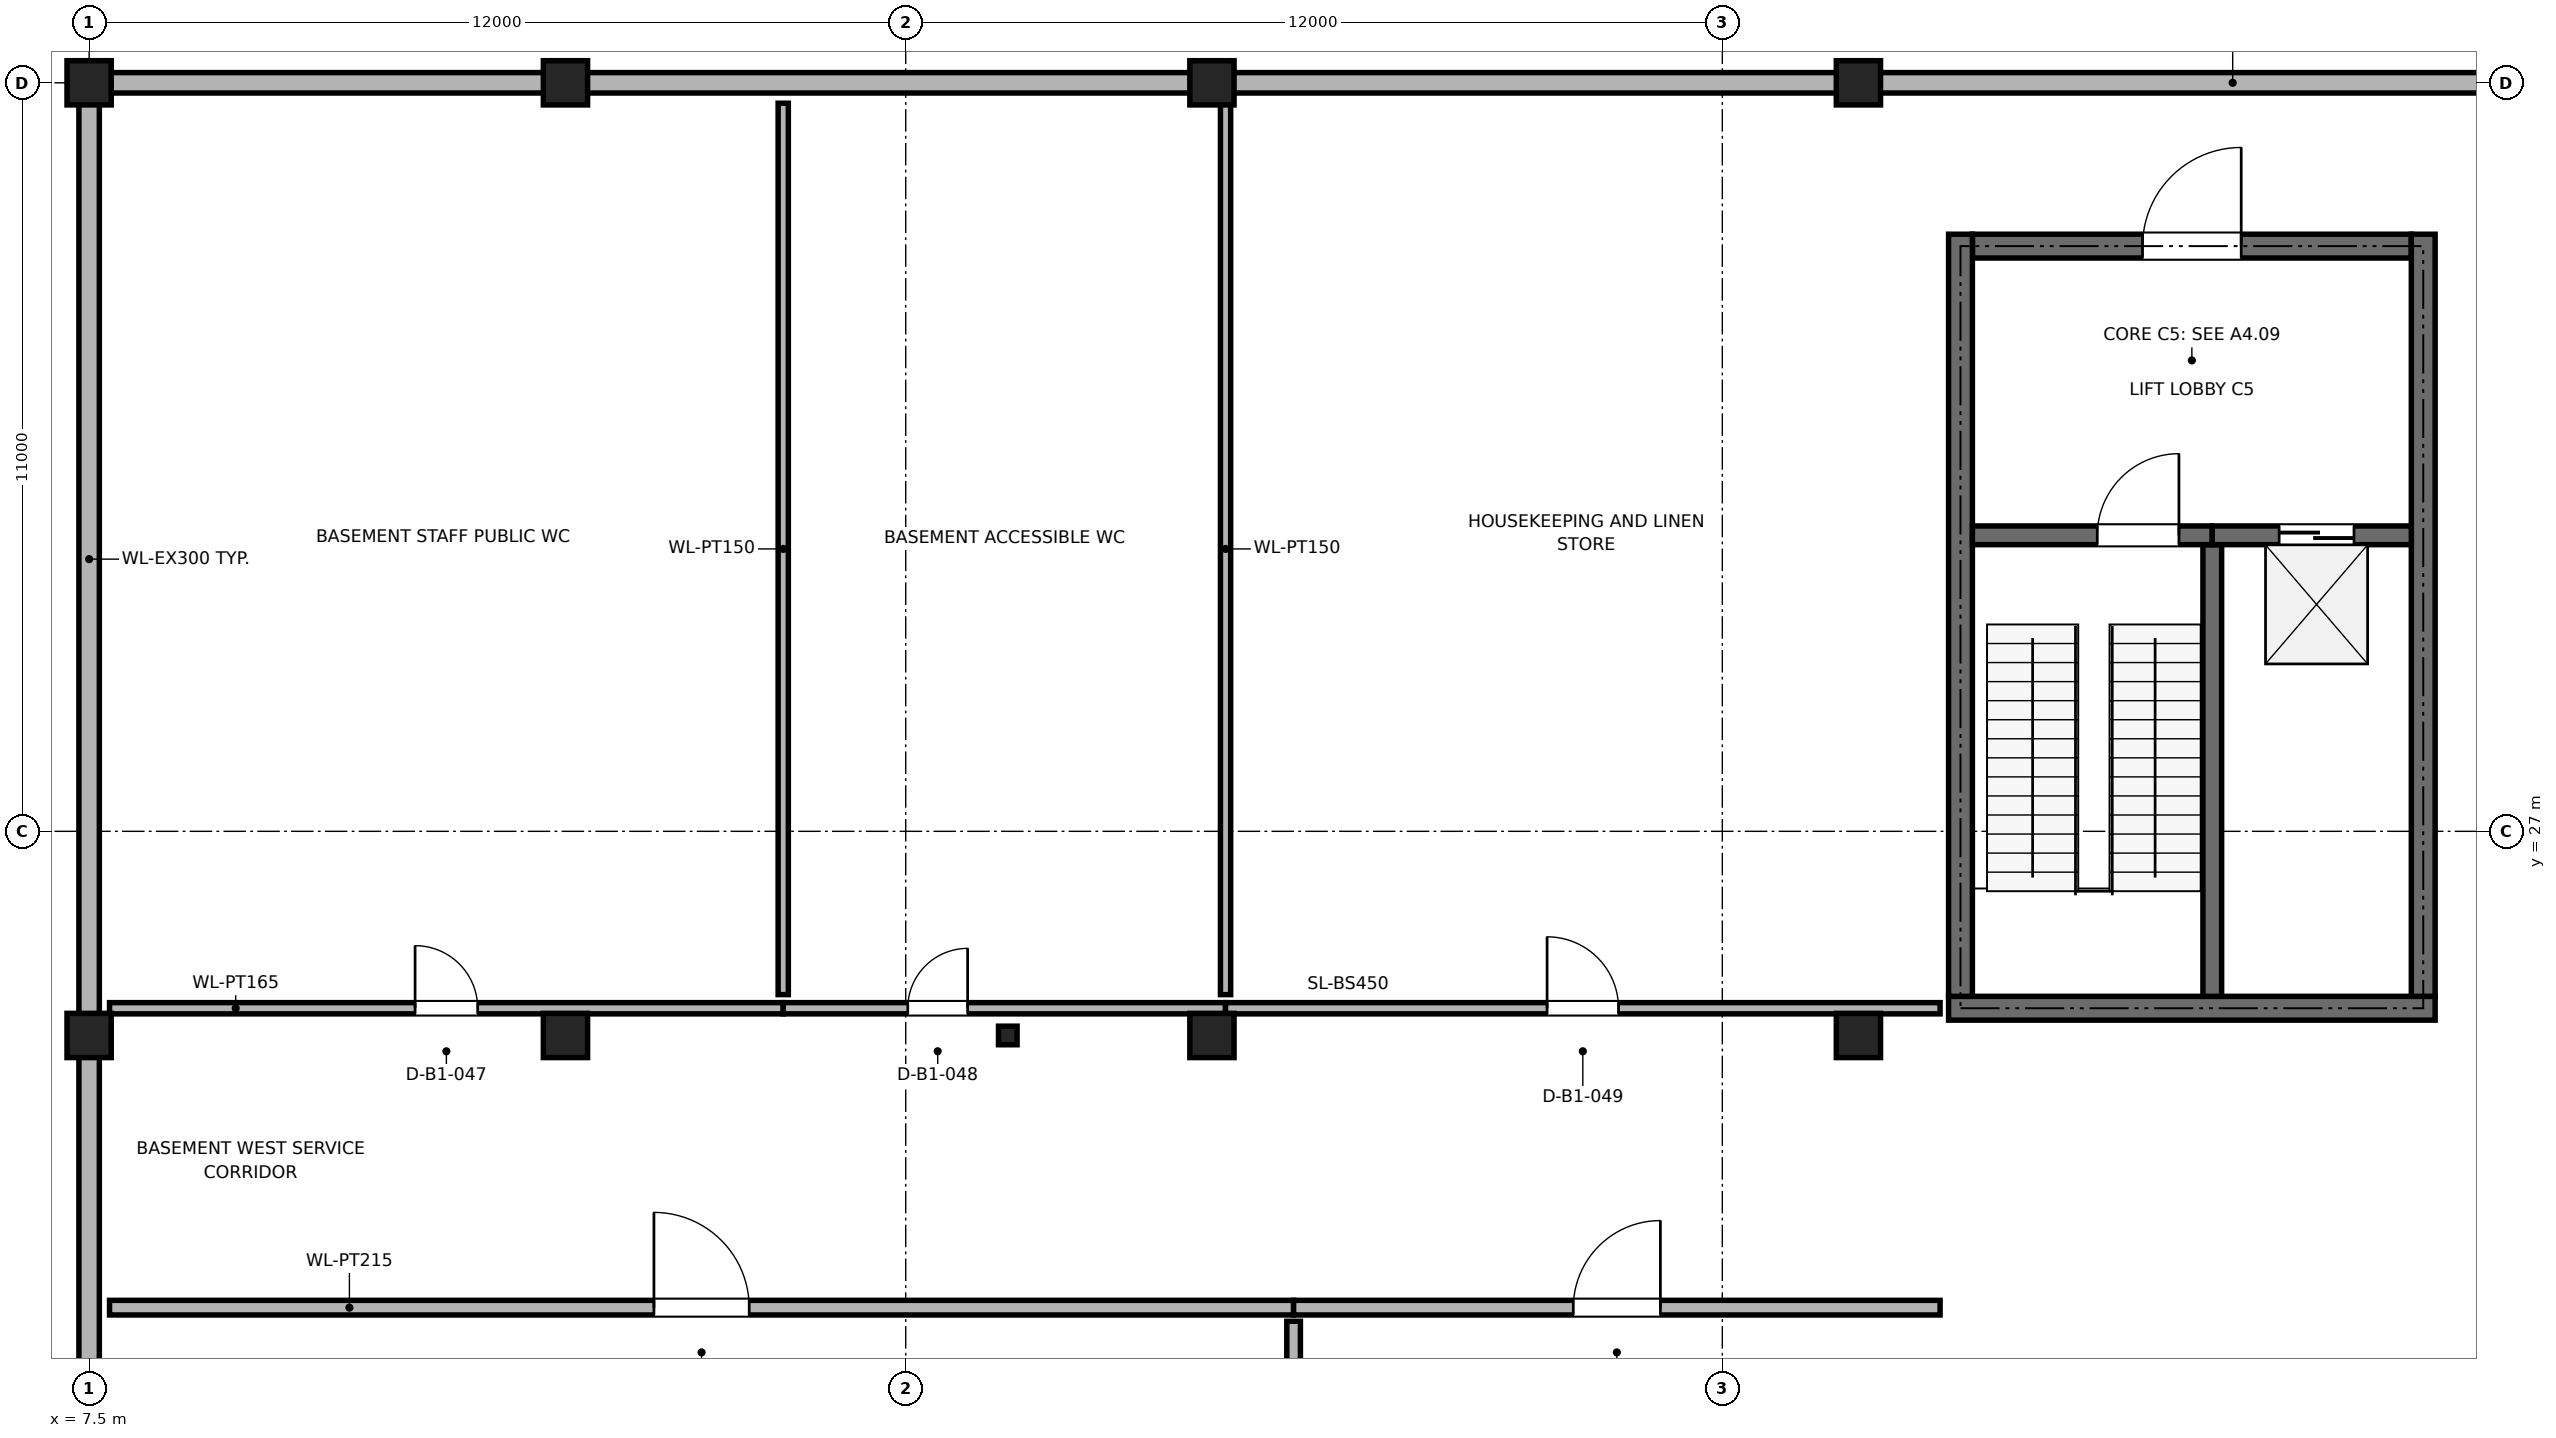
"""IFC4 building model, lengths in metres.
Left out: names, types, materials, properties, quantities, classifications, styles, units other than length and angle.
Written with IfcOpenShell. Run it as: python <this file> out.ifc"""

import sys

from ifc_helpers import new_model, si_unit, direction, frame, frame_2d, origin, origin_2d, place, context, subcontext, project, spatial, rectangle, hollow_circle, extrude, element, fill, save


model = new_model("IFC4")
c1 = context("Model", 3, precision=1e-05, world=origin(), true_north=direction((0.0, 1.0)))
c2 = subcontext(c1, "Body", "Model", "MODEL_VIEW")
j1 = project(units=[si_unit("LENGTHUNIT", "METRE"), si_unit("PLANEANGLEUNIT", "RADIAN")], contexts=[c1])
p1 = place(None, origin())
s1 = spatial("IfcSite", under=j1, at=p1, CompositionType="ELEMENT")
p2 = place(p1, origin())
s2 = spatial("IfcBuilding", under=s1, at=p2, CompositionType="ELEMENT")
p3 = place(p2, frame((0.0, 0.0, -4.8)))
s3 = spatial("IfcBuildingStorey", under=s2, at=p3, CompositionType="ELEMENT", Elevation=-4.8)
for number, where, z_axis, x_axis in (
    (1, (33.5, 38.0, 0.0), (0.0, 0.0, 1.0), (1.0, 0.0, 0.0)),
    (2, (24.0, 38.0, 0.0), (0.0, 0.0, 1.0), (1.0, 0.0, 0.0)),
    (3, (14.5, 38.0, 0.0), (0.0, 0.0, 1.0), (1.0, 0.0, 0.0)),
    (4, (7.5, 38.0, 0.0), (0.0, 0.0, 1.0), (1.0, 0.0, 0.0)),
    (5, (7.5, 24.0, 0.0), (0.0, 0.0, 1.0), (1.0, 0.0, 0.0)),
    (6, (14.5, 24.0, 0.0), (0.0, 0.0, 1.0), (1.0, 0.0, 0.0)),
    (7, (24.0, 24.0, 0.0), (0.0, 0.0, 1.0), (1.0, 0.0, 0.0)),
    (8, (33.5, 24.0, 0.0), (0.0, 0.0, 1.0), (1.0, 0.0, 0.0)),
):
    element("IfcColumn", number, at=place(p3, frame(where, z_axis=z_axis, x_axis=x_axis)), inside=s3, PredefinedType="COLUMN", context=c2, shape_type="SweptSolid", body=[
        extrude(rectangle(XDim=0.65, YDim=0.65, at=origin_2d()), origin(), (0.0, 0.0, 1.0), 4.8),
    ])
p4 = place(p3, frame((21.0, 24.0, 0.0), z_axis=(0.0, 0.0, 1.0), x_axis=(1.0, 0.0, 0.0)))
e9 = element("IfcColumn", 9, at=p4, inside=s3, PredefinedType="COLUMN", context=c2, shape_type="SweptSolid", body=[
    extrude(hollow_circle(Radius=0.136, WallThickness=0.016, at=origin_2d()), origin(), (0.0, 0.0, 1.0), 4.8),
])
p5 = place(p3, frame((33.52, 38.0, 0.0), z_axis=(0.0, 0.0, 1.0), x_axis=(1.0, 0.0, 0.0)))
e10 = element("IfcWall", 10, at=p5, inside=s3, PredefinedType="SOLIDWALL", context=c2, shape_type="SweptSolid", body=[
    extrude(rectangle(XDim=10.96, YDim=0.3, at=frame_2d((5.48, 0.0))), origin(), (0.0, 0.0, 1.0), 3.738),
])
for number, where, z_axis, x_axis in (
    (11, (24.02, 38.0, 0.0), (0.0, 0.0, 1.0), (1.0, 0.0, 0.0)),
    (12, (14.52, 38.0, 0.0), (0.0, 0.0, 1.0), (1.0, 0.0, 0.0)),
):
    element("IfcWall", number, at=place(p3, frame(where, z_axis=z_axis, x_axis=x_axis)), inside=s3, PredefinedType="SOLIDWALL", context=c2, shape_type="SweptSolid", body=[
        extrude(rectangle(XDim=9.46, YDim=0.3, at=frame_2d((4.73, 0.0))), origin(), (0.0, 0.0, 1.0), 3.738),
    ])
p6 = place(p3, frame((7.52, 38.0, 0.0), z_axis=(0.0, 0.0, 1.0), x_axis=(1.0, 0.0, 0.0)))
e13 = element("IfcWall", 13, at=p6, inside=s3, PredefinedType="SOLIDWALL", context=c2, shape_type="SweptSolid", body=[
    extrude(rectangle(XDim=6.96, YDim=0.3, at=frame_2d((3.48, 0.0))), origin(), (0.0, 0.0, 1.0), 3.738),
])
p7 = place(p3, frame((7.5, 24.02, 0.0), z_axis=(0.0, 0.0, 1.0), x_axis=(0.0, 1.0, 0.0)))
e14 = element("IfcWall", 14, at=p7, inside=s3, PredefinedType="SOLIDWALL", context=c2, shape_type="SweptSolid", body=[
    extrude(rectangle(XDim=13.96, YDim=0.3, at=frame_2d((6.98, 0.0))), origin(), (0.0, 0.0, 1.0), 3.738),
])
p8 = place(p3, frame((7.5, 11.52, 0.0), z_axis=(0.0, 0.0, 1.0), x_axis=(0.0, 1.0, 0.0)))
e15 = element("IfcWall", 15, at=p8, inside=s3, PredefinedType="SOLIDWALL", context=c2, shape_type="SweptSolid", body=[
    extrude(rectangle(XDim=12.46, YDim=0.3, at=frame_2d((6.23, 0.0))), origin(), (0.0, 0.0, 1.0), 3.738),
])
p9 = place(p3, frame((34.825, 24.4, 0.0), z_axis=(0.0, 0.0, 1.0), x_axis=(1.0, 0.0, 0.0)))
e16 = element("IfcWall", 16, at=p9, inside=s3, PredefinedType="SHEAR", context=c2, shape_type="SweptSolid", body=[
    extrude(rectangle(XDim=7.15, YDim=0.35, at=frame_2d((3.575, 0.0))), origin(), (0.0, 0.0, 1.0), 4.5),
])
p10 = place(p3, frame((35.175, 35.6, 0.0), z_axis=(0.0, 0.0, 1.0), x_axis=(1.0, 0.0, 0.0)))
e17 = element("IfcWall", 17, at=p10, inside=s3, PredefinedType="SHEAR", context=c2, shape_type="SweptSolid", body=[
    extrude(rectangle(XDim=6.45, YDim=0.35, at=frame_2d((3.225, 0.0))), origin(), (0.0, 0.0, 1.0), 4.5),
])
p11 = place(p10, frame((2.5, 0.0, 0.0)))
e18 = element("IfcOpeningElement", 18, at=p11, cuts=e17, PredefinedType="OPENING", context=c2, shape_type="SweptSolid", body=[
    extrude(rectangle(XDim=1.45, YDim=2.2, at=frame_2d((0.725, 1.1))), frame((0.0, 0.185, 0.0), z_axis=(0.0, -1.0, 0.0), x_axis=(1.0, 0.0, 0.0)), (0.0, 0.0, 1.0), 0.37),
])
for number, where, z_axis, x_axis in (
    (19, (35.0, 24.575, 0.0), (0.0, 0.0, 1.0), (0.0, 1.0, 0.0)),
    (20, (41.8, 24.575, 0.0), (0.0, 0.0, 1.0), (0.0, 1.0, 0.0)),
):
    element("IfcWall", number, at=place(p3, frame(where, z_axis=z_axis, x_axis=x_axis)), inside=s3, PredefinedType="SHEAR", context=c2, shape_type="SweptSolid", body=[
        extrude(rectangle(XDim=11.2, YDim=0.35, at=frame_2d((5.6, 0.0))), origin(), (0.0, 0.0, 1.0), 4.5),
    ])
p12 = place(p3, frame((38.7, 24.575, 0.0), z_axis=(0.0, 0.0, 1.0), x_axis=(0.0, 1.0, 0.0)))
e21 = element("IfcWall", 21, at=p12, inside=s3, PredefinedType="SHEAR", context=c2, shape_type="SweptSolid", body=[
    extrude(rectangle(XDim=6.637, YDim=0.275, at=frame_2d((3.319, 0.0))), origin(), (0.0, 0.0, 1.0), 4.5),
])
p13 = place(p3, frame((35.175, 31.35, 0.0), z_axis=(0.0, 0.0, 1.0), x_axis=(1.0, 0.0, 0.0)))
e22 = element("IfcWall", 22, at=p13, inside=s3, PredefinedType="SHEAR", context=c2, shape_type="SweptSolid", body=[
    extrude(rectangle(XDim=3.525, YDim=0.275, at=frame_2d((1.762, 0.0))), origin(), (0.0, 0.0, 1.0), 4.5),
])
p14 = place(p13, frame((1.835, 0.0, 0.0)))
e23 = element("IfcOpeningElement", 23, at=p14, cuts=e22, PredefinedType="OPENING", context=c2, shape_type="SweptSolid", body=[
    extrude(rectangle(XDim=1.2, YDim=2.15, at=frame_2d((0.6, 1.075))), frame((0.0, 0.147, 0.0), z_axis=(0.0, -1.0, 0.0), x_axis=(1.0, 0.0, 0.0)), (0.0, 0.0, 1.0), 0.295),
])
p15 = place(p3, frame((38.7, 31.35, 0.0), z_axis=(0.0, 0.0, 1.0), x_axis=(1.0, 0.0, 0.0)))
e24 = element("IfcWall", 24, at=p15, inside=s3, PredefinedType="SHEAR", context=c2, shape_type="SweptSolid", body=[
    extrude(rectangle(XDim=2.925, YDim=0.275, at=frame_2d((1.462, 0.0))), origin(), (0.0, 0.0, 1.0), 4.5),
])
p16 = place(p15, frame((0.982, 0.0, 0.0)))
e25 = element("IfcOpeningElement", 25, at=p16, cuts=e24, PredefinedType="OPENING", context=c2, shape_type="SweptSolid", body=[
    extrude(rectangle(XDim=1.1, YDim=2.15, at=frame_2d((0.55, 1.075))), frame((0.0, 0.147, 0.0), z_axis=(0.0, -1.0, 0.0), x_axis=(1.0, 0.0, 0.0)), (0.0, 0.0, 1.0), 0.295),
])
p17 = place(p3, frame((7.8, 20.0, 0.0), z_axis=(0.0, 0.0, 1.0), x_axis=(1.0, 0.0, 0.0)))
e26 = element("IfcWall", 26, at=p17, inside=s3, PredefinedType="PARTITIONING", context=c2, shape_type="SweptSolid", body=[
    extrude(rectangle(XDim=17.4, YDim=0.215, at=frame_2d((8.7, 0.0))), origin(), (0.0, 0.0, 1.0), 3.74),
])
p18 = place(p17, frame((8.0, 0.0, 0.0)))
e27 = element("IfcOpeningElement", 27, at=p18, cuts=e26, PredefinedType="OPENING", context=c2, shape_type="SweptSolid", body=[
    extrude(rectangle(XDim=1.4, YDim=2.2, at=frame_2d((0.7, 1.1))), frame((0.0, 0.117, 0.0), z_axis=(0.0, -1.0, 0.0), x_axis=(1.0, 0.0, 0.0)), (0.0, 0.0, 1.0), 0.235),
])
p19 = place(p3, frame((25.2, 20.0, 0.0), z_axis=(0.0, 0.0, 1.0), x_axis=(1.0, 0.0, 0.0)))
e28 = element("IfcWall", 28, at=p19, inside=s3, PredefinedType="PARTITIONING", context=c2, shape_type="SweptSolid", body=[
    extrude(rectangle(XDim=9.5, YDim=0.215, at=frame_2d((4.75, 0.0))), origin(), (0.0, 0.0, 1.0), 3.74),
])
p20 = place(p19, frame((4.11, 0.0, 0.0)))
e29 = element("IfcOpeningElement", 29, at=p20, cuts=e28, PredefinedType="OPENING", context=c2, shape_type="SweptSolid", body=[
    extrude(rectangle(XDim=1.28, YDim=2.18, at=frame_2d((0.64, 1.09))), frame((0.0, 0.117, 0.0), z_axis=(0.0, -1.0, 0.0), x_axis=(1.0, 0.0, 0.0)), (0.0, 0.0, 1.0), 0.235),
])
p21 = place(p3, frame((25.2, 5.3, 0.0), z_axis=(0.0, 0.0, 1.0), x_axis=(0.0, 1.0, 0.0)))
e30 = element("IfcWall", 30, at=p21, inside=s3, PredefinedType="PARTITIONING", context=c2, shape_type="SweptSolid", body=[
    extrude(rectangle(XDim=14.5, YDim=0.2, at=frame_2d((7.25, 0.0))), origin(), (0.0, 0.0, 1.0), 3.74),
])
p22 = place(p3, frame((7.8, 24.4, 0.0), z_axis=(0.0, 0.0, 1.0), x_axis=(1.0, 0.0, 0.0)))
e31 = element("IfcWall", 31, at=p22, inside=s3, PredefinedType="PARTITIONING", context=c2, shape_type="SweptSolid", body=[
    extrude(rectangle(XDim=9.9, YDim=0.165, at=frame_2d((4.95, 0.0))), origin(), (0.0, 0.0, 1.0), 3.74),
])
p23 = place(p22, frame((4.49, 0.0, 0.0)))
e32 = element("IfcOpeningElement", 32, at=p23, cuts=e31, PredefinedType="OPENING", context=c2, shape_type="SweptSolid", body=[
    extrude(rectangle(XDim=0.92, YDim=2.1, at=frame_2d((0.46, 1.05))), frame((0.0, 0.093, 0.0), z_axis=(0.0, -1.0, 0.0), x_axis=(1.0, 0.0, 0.0)), (0.0, 0.0, 1.0), 0.185),
])
p24 = place(p3, frame((17.7, 24.4, 0.0), z_axis=(0.0, 0.0, 1.0), x_axis=(1.0, 0.0, 0.0)))
e33 = element("IfcWall", 33, at=p24, inside=s3, PredefinedType="PARTITIONING", context=c2, shape_type="SweptSolid", body=[
    extrude(rectangle(XDim=6.5, YDim=0.165, at=frame_2d((3.25, 0.0))), origin(), (0.0, 0.0, 1.0), 3.74),
])
p25 = place(p24, frame((1.83, 0.0, 0.0)))
e34 = element("IfcOpeningElement", 34, at=p25, cuts=e33, PredefinedType="OPENING", context=c2, shape_type="SweptSolid", body=[
    extrude(rectangle(XDim=0.88, YDim=2.1, at=frame_2d((0.44, 1.05))), frame((0.0, 0.093, 0.0), z_axis=(0.0, -1.0, 0.0), x_axis=(1.0, 0.0, 0.0)), (0.0, 0.0, 1.0), 0.185),
])
p26 = place(p3, frame((24.2, 24.4, 0.0), z_axis=(0.0, 0.0, 1.0), x_axis=(1.0, 0.0, 0.0)))
e35 = element("IfcWall", 35, at=p26, inside=s3, PredefinedType="PARTITIONING", context=c2, shape_type="SweptSolid", body=[
    extrude(rectangle(XDim=10.5, YDim=0.165, at=frame_2d((5.25, 0.0))), origin(), (0.0, 0.0, 1.0), 3.74),
])
p27 = place(p26, frame((4.725, 0.0, 0.0)))
e36 = element("IfcOpeningElement", 36, at=p27, cuts=e35, PredefinedType="OPENING", context=c2, shape_type="SweptSolid", body=[
    extrude(rectangle(XDim=1.05, YDim=2.15, at=frame_2d((0.525, 1.075))), frame((0.0, 0.093, 0.0), z_axis=(0.0, -1.0, 0.0), x_axis=(1.0, 0.0, 0.0)), (0.0, 0.0, 1.0), 0.185),
])
for number, where, z_axis, x_axis in (
    (37, (17.7, 24.6, 0.0), (0.0, 0.0, 1.0), (0.0, 1.0, 0.0)),
    (38, (24.2, 24.6, 0.0), (0.0, 0.0, 1.0), (0.0, 1.0, 0.0)),
):
    element("IfcWall", number, at=place(p3, frame(where, z_axis=z_axis, x_axis=x_axis)), inside=s3, PredefinedType="PARTITIONING", context=c2, shape_type="SweptSolid", body=[
        extrude(rectangle(XDim=13.1, YDim=0.15, at=frame_2d((6.55, 0.0))), origin(), (0.0, 0.0, 1.0), 3.74),
    ])
p28 = place(p14, origin())
e39 = element("IfcDoor", 39, at=p28, inside=s3, OperationType="SINGLE_SWING_RIGHT", PredefinedType="DOOR", context=c2, shape_type="SweptSolid", body=[
    extrude(rectangle(XDim=1.2, YDim=2.15, at=frame_2d((0.6, 1.075))), frame((0.0, 0.025, 0.0), z_axis=(0.0, -1.0, 0.0), x_axis=(1.0, 0.0, 0.0)), (0.0, 0.0, 1.0), 0.05),
])
fill(e23, e39)
p29 = place(p16, origin())
e40 = element("IfcDoor", 40, at=p29, inside=s3, OperationType="DOUBLE_DOOR_SLIDING", PredefinedType="DOOR", context=c2, shape_type="SweptSolid", body=[
    extrude(rectangle(XDim=1.1, YDim=2.15, at=frame_2d((0.55, 1.075))), frame((0.0, 0.025, 0.0), z_axis=(0.0, -1.0, 0.0), x_axis=(1.0, 0.0, 0.0)), (0.0, 0.0, 1.0), 0.05),
])
fill(e25, e40)
p30 = place(p11, origin())
e41 = element("IfcDoor", 41, at=p30, inside=s3, OperationType="SINGLE_SWING_RIGHT", PredefinedType="DOOR", context=c2, shape_type="SweptSolid", body=[
    extrude(rectangle(XDim=1.45, YDim=2.2, at=frame_2d((0.725, 1.1))), frame((0.0, 0.025, 0.0), z_axis=(0.0, -1.0, 0.0), x_axis=(1.0, 0.0, 0.0)), (0.0, 0.0, 1.0), 0.05),
])
fill(e18, e41)
p31 = place(p18, origin())
e42 = element("IfcDoor", 42, at=p31, inside=s3, OperationType="SINGLE_SWING_LEFT", PredefinedType="DOOR", context=c2, shape_type="SweptSolid", body=[
    extrude(rectangle(XDim=1.4, YDim=2.2, at=frame_2d((0.7, 1.1))), frame((0.0, 0.025, 0.0), z_axis=(0.0, -1.0, 0.0), x_axis=(1.0, 0.0, 0.0)), (0.0, 0.0, 1.0), 0.05),
])
fill(e27, e42)
p32 = place(p20, origin())
e43 = element("IfcDoor", 43, at=p32, inside=s3, OperationType="SINGLE_SWING_RIGHT", PredefinedType="DOOR", context=c2, shape_type="SweptSolid", body=[
    extrude(rectangle(XDim=1.28, YDim=2.18, at=frame_2d((0.64, 1.09))), frame((0.0, 0.025, 0.0), z_axis=(0.0, -1.0, 0.0), x_axis=(1.0, 0.0, 0.0)), (0.0, 0.0, 1.0), 0.05),
])
fill(e29, e43)
p33 = place(p23, origin())
e44 = element("IfcDoor", 44, at=p33, inside=s3, OperationType="SINGLE_SWING_LEFT", PredefinedType="DOOR", context=c2, shape_type="SweptSolid", body=[
    extrude(rectangle(XDim=0.92, YDim=2.1, at=frame_2d((0.46, 1.05))), frame((0.0, 0.025, 0.0), z_axis=(0.0, -1.0, 0.0), x_axis=(1.0, 0.0, 0.0)), (0.0, 0.0, 1.0), 0.05),
])
fill(e32, e44)
p34 = place(p25, origin())
e45 = element("IfcDoor", 45, at=p34, inside=s3, OperationType="SINGLE_SWING_RIGHT", PredefinedType="DOOR", context=c2, shape_type="SweptSolid", body=[
    extrude(rectangle(XDim=0.88, YDim=2.1, at=frame_2d((0.44, 1.05))), frame((0.0, 0.025, 0.0), z_axis=(0.0, -1.0, 0.0), x_axis=(1.0, 0.0, 0.0)), (0.0, 0.0, 1.0), 0.05),
])
fill(e34, e45)
p35 = place(p27, origin())
e46 = element("IfcDoor", 46, at=p35, inside=s3, OperationType="SINGLE_SWING_LEFT", PredefinedType="DOOR", context=c2, shape_type="SweptSolid", body=[
    extrude(rectangle(XDim=1.05, YDim=2.15, at=frame_2d((0.525, 1.075))), frame((0.0, 0.025, 0.0), z_axis=(0.0, -1.0, 0.0), x_axis=(1.0, 0.0, 0.0)), (0.0, 0.0, 1.0), 0.05),
])
fill(e36, e46)
save(model, sys.argv[1])
